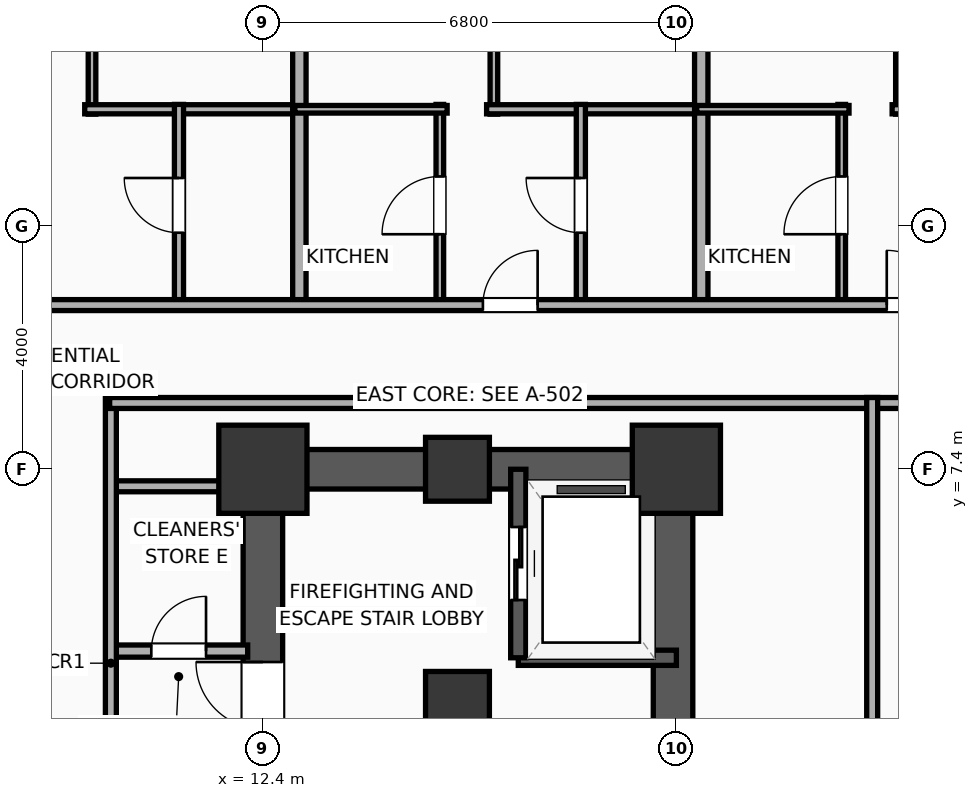
"""IFC4 building model, lengths in metres.
Left out: names, types, materials, properties, quantities, classifications, styles, units other than length and angle.
Written with IfcOpenShell. Run it as: python <this file> out.ifc"""

import sys

from ifc_helpers import new_model, si_unit, direction, frame, frame_2d, origin, origin_2d, place, context, subcontext, project, spatial, rectangle, extrude, element, fill, save


model = new_model("IFC4")
c1 = context("Model", 3, precision=1e-05, world=origin(), true_north=direction((0.0, 1.0)))
c2 = subcontext(c1, "Body", "Model", "MODEL_VIEW")
j1 = project(units=[si_unit("LENGTHUNIT", "METRE"), si_unit("PLANEANGLEUNIT", "RADIAN")], contexts=[c1])
p1 = place(None, origin())
s1 = spatial("IfcSite", under=j1, at=p1, CompositionType="ELEMENT")
p2 = place(p1, origin())
s2 = spatial("IfcBuilding", under=s1, at=p2, CompositionType="ELEMENT")
p3 = place(p2, frame((0.0, 0.0, 41.6)))
s3 = spatial("IfcBuildingStorey", under=s2, at=p3, CompositionType="ELEMENT", Elevation=41.6)
p4 = place(p3, frame((15.6, 3.55, 0.0), z_axis=(0.0, 0.0, 1.0), x_axis=(1.0, 0.0, 0.0)))
e1 = element("IfcColumn", 1, at=p4, inside=s3, PredefinedType="COLUMN", context=c2, shape_type="SweptSolid", body=[
    extrude(rectangle(XDim=1.05, YDim=1.05, at=origin_2d()), origin(), (0.0, 0.0, 1.0), 3.9),
])
p5 = place(p3, frame((12.4, 7.4, 0.0), z_axis=(0.0, 0.0, 1.0), x_axis=(1.0, 0.0, 0.0)))
e2 = element("IfcColumn", 2, at=p5, inside=s3, PredefinedType="COLUMN", context=c2, shape_type="SweptSolid", body=[
    extrude(rectangle(XDim=1.45, YDim=1.45, at=origin_2d()), origin(), (0.0, 0.0, 1.0), 3.9),
])
p6 = place(p3, frame((15.6, 7.4, 0.0), z_axis=(0.0, 0.0, 1.0), x_axis=(1.0, 0.0, 0.0)))
e3 = element("IfcColumn", 3, at=p6, inside=s3, PredefinedType="COLUMN", context=c2, shape_type="SweptSolid", body=[
    extrude(rectangle(XDim=1.05, YDim=1.05, at=origin_2d()), origin(), (0.0, 0.0, 1.0), 3.9),
])
p7 = place(p3, frame((19.2, 7.4, 0.0), z_axis=(0.0, 0.0, 1.0), x_axis=(1.0, 0.0, 0.0)))
e4 = element("IfcColumn", 4, at=p7, inside=s3, PredefinedType="COLUMN", context=c2, shape_type="SweptSolid", body=[
    extrude(rectangle(XDim=1.45, YDim=1.45, at=origin_2d()), origin(), (0.0, 0.0, 1.0), 3.9),
])
p8 = place(p3, frame((12.075, 7.4, 0.0), z_axis=(0.0, 0.0, 1.0), x_axis=(1.0, 0.0, 0.0)))
e5 = element("IfcWall", 5, at=p8, inside=s3, PredefinedType="SHEAR", context=c2, shape_type="SweptSolid", body=[
    extrude(rectangle(XDim=7.45, YDim=0.65, at=frame_2d((3.725, 0.0))), origin(), (0.0, 0.0, 1.0), 3.65),
])
p9 = place(p3, frame((12.4, -7.4, 0.0), z_axis=(0.0, 0.0, 1.0), x_axis=(0.0, 1.0, 0.0)))
e6 = element("IfcWall", 6, at=p9, inside=s3, PredefinedType="SHEAR", context=c2, shape_type="SweptSolid", body=[
    extrude(rectangle(XDim=14.8, YDim=0.65, at=frame_2d((7.4, 0.0))), origin(), (0.0, 0.0, 1.0), 3.65),
])
p10 = place(p9, frame((0.85, 0.0, 0.0)))
e7 = element("IfcOpeningElement", 7, at=p10, cuts=e6, PredefinedType="OPENING", context=c2, shape_type="SweptSolid", body=[
    extrude(rectangle(XDim=1.1, YDim=2.05, at=frame_2d((0.55, 1.025))), frame((0.0, 0.335, 0.0), z_axis=(0.0, -1.0, 0.0), x_axis=(1.0, 0.0, 0.0)), (0.0, 0.0, 1.0), 0.67),
])
p11 = place(p9, frame((10.53, 0.0, 0.0)))
e8 = element("IfcOpeningElement", 8, at=p11, cuts=e6, PredefinedType="OPENING", context=c2, shape_type="SweptSolid", body=[
    extrude(rectangle(XDim=1.1, YDim=2.05, at=frame_2d((0.55, 1.025))), frame((0.0, 0.335, 0.0), z_axis=(0.0, -1.0, 0.0), x_axis=(1.0, 0.0, 0.0)), (0.0, 0.0, 1.0), 0.67),
])
p12 = place(p3, frame((19.145, -7.4, 0.0), z_axis=(0.0, 0.0, 1.0), x_axis=(0.0, 1.0, 0.0)))
e9 = element("IfcWall", 9, at=p12, inside=s3, PredefinedType="SHEAR", context=c2, shape_type="SweptSolid", body=[
    extrude(rectangle(XDim=14.8, YDim=0.65, at=frame_2d((7.4, 0.0))), origin(), (0.0, 0.0, 1.0), 3.65),
])
p13 = place(p3, frame((16.6, 4.3, 0.0), z_axis=(0.0, 0.0, 1.0), x_axis=(1.0, 0.0, 0.0)))
e10 = element("IfcWall", 10, at=p13, inside=s3, PredefinedType="SOLIDWALL", context=c2, shape_type="SweptSolid", body=[
    extrude(rectangle(XDim=2.6, YDim=0.25, at=frame_2d((1.3, 0.0))), origin(), (0.0, 0.0, 1.0), 3.65),
])
p14 = place(p3, frame((16.6, 7.4, 0.0), z_axis=(0.0, 0.0, 1.0), x_axis=(0.0, -1.0, 0.0)))
e11 = element("IfcWall", 11, at=p14, inside=s3, PredefinedType="SOLIDWALL", context=c2, shape_type="SweptSolid", body=[
    extrude(rectangle(XDim=3.1, YDim=0.25, at=frame_2d((1.55, 0.0))), origin(), (0.0, 0.0, 1.0), 3.65),
])
p15 = place(p14, frame((0.95, 0.0, 0.0)))
e12 = element("IfcOpeningElement", 12, at=p15, cuts=e11, PredefinedType="OPENING", context=c2, shape_type="SweptSolid", body=[
    extrude(rectangle(XDim=1.2, YDim=2.05, at=frame_2d((0.6, 1.025))), frame((0.0, 0.135, 0.0), z_axis=(0.0, -1.0, 0.0), x_axis=(1.0, 0.0, 0.0)), (0.0, 0.0, 1.0), 0.27),
])
p16 = place(p3, frame((9.88, 4.41, 0.0), z_axis=(0.0, 0.0, 1.0), x_axis=(1.0, 0.0, 0.0)))
e13 = element("IfcWall", 13, at=p16, inside=s3, PredefinedType="PARTITIONING", context=c2, shape_type="SweptSolid", body=[
    extrude(rectangle(XDim=2.27, YDim=0.2, at=frame_2d((1.135, 0.0))), origin(), (0.0, 0.0, 1.0), 3.65),
])
p17 = place(p16, frame((0.685, 0.0, 0.0)))
e14 = element("IfcOpeningElement", 14, at=p17, cuts=e13, PredefinedType="OPENING", context=c2, shape_type="SweptSolid", body=[
    extrude(rectangle(XDim=0.9, YDim=2.05, at=frame_2d((0.45, 1.025))), frame((0.0, 0.11, 0.0), z_axis=(0.0, -1.0, 0.0), x_axis=(1.0, 0.0, 0.0)), (0.0, 0.0, 1.0), 0.22),
])
p18 = place(p3, frame((9.88, 7.12, 0.0), z_axis=(0.0, 0.0, 1.0), x_axis=(1.0, 0.0, 0.0)))
e15 = element("IfcWall", 15, at=p18, inside=s3, PredefinedType="PARTITIONING", context=c2, shape_type="SweptSolid", body=[
    extrude(rectangle(XDim=2.27, YDim=0.18, at=frame_2d((1.135, 0.0))), origin(), (0.0, 0.0, 1.0), 2.94),
])
p19 = place(p3, frame((9.9, -8.58, 0.0), z_axis=(0.0, 0.0, 1.0), x_axis=(0.0, 1.0, 0.0)))
e16 = element("IfcWall", 16, at=p19, inside=s3, PredefinedType="PARTITIONING", context=c2, shape_type="SweptSolid", body=[
    extrude(rectangle(XDim=17.16, YDim=0.18, at=frame_2d((8.58, 0.0))), origin(), (0.0, 0.0, 1.0), 3.65),
])
p20 = place(p19, frame((7.172, 0.0, 0.0)))
e17 = element("IfcOpeningElement", 17, at=p20, cuts=e16, PredefinedType="OPENING", context=c2, shape_type="SweptSolid", body=[
    extrude(rectangle(XDim=1.1, YDim=2.05, at=frame_2d((0.55, 1.025))), frame((0.0, 0.1, 0.0), z_axis=(0.0, -1.0, 0.0), x_axis=(1.0, 0.0, 0.0)), (0.0, 0.0, 1.0), 0.2),
])
p21 = place(p3, frame((9.88, 8.49, 0.0), z_axis=(0.0, 0.0, 1.0), x_axis=(1.0, 0.0, 0.0)))
e18 = element("IfcWall", 18, at=p21, inside=s3, PredefinedType="PARTITIONING", context=c2, shape_type="SweptSolid", body=[
    extrude(rectangle(XDim=16.33, YDim=0.18, at=frame_2d((8.165, 0.0))), origin(), (0.0, 0.0, 1.0), 3.65),
])
p22 = place(p21, frame((13.99, 0.0, 0.0)))
e19 = element("IfcOpeningElement", 19, at=p22, cuts=e18, PredefinedType="OPENING", context=c2, shape_type="SweptSolid", body=[
    extrude(rectangle(XDim=0.9, YDim=2.05, at=frame_2d((0.45, 1.025))), frame((0.0, 0.1, 0.0), z_axis=(0.0, -1.0, 0.0), x_axis=(1.0, 0.0, 0.0)), (0.0, 0.0, 1.0), 0.2),
])
p23 = place(p3, frame((9.59, 13.24, 0.0), z_axis=(0.0, 0.0, 1.0), x_axis=(0.0, 1.0, 0.0)))
e20 = element("IfcWall", 20, at=p23, inside=s3, PredefinedType="PARTITIONING", context=c2, shape_type="SweptSolid", body=[
    extrude(rectangle(XDim=9.12, YDim=0.125, at=frame_2d((4.56, 0.0))), origin(), (0.0, 0.0, 1.0), 3.65),
])
p24 = place(p23, frame((1.739, 0.0, 0.0)))
e21 = element("IfcOpeningElement", 21, at=p24, cuts=e20, PredefinedType="OPENING", context=c2, shape_type="SweptSolid", body=[
    extrude(rectangle(XDim=0.9, YDim=2.05, at=frame_2d((0.45, 1.025))), frame((0.0, 0.073, 0.0), z_axis=(0.0, -1.0, 0.0), x_axis=(1.0, 0.0, 0.0)), (0.0, 0.0, 1.0), 0.145),
])
p25 = place(p3, frame((9.47, 13.32, 0.0), z_axis=(0.0, 0.0, 1.0), x_axis=(1.0, 0.0, 0.0)))
e22 = element("IfcWall", 22, at=p25, inside=s3, PredefinedType="PLUMBINGWALL", context=c2, shape_type="SweptSolid", body=[
    extrude(rectangle(XDim=3.605, YDim=0.15, at=frame_2d((1.802, 0.0))), origin(), (0.0, 0.0, 1.0), 3.65),
])
p26 = place(p3, frame((11.02, 10.08, 0.0), z_axis=(0.0, 0.0, 1.0), x_axis=(0.0, 1.0, 0.0)))
e23 = element("IfcWall", 23, at=p26, inside=s3, PredefinedType="PLUMBINGWALL", context=c2, shape_type="SweptSolid", body=[
    extrude(rectangle(XDim=3.32, YDim=0.15, at=frame_2d((1.66, 0.0))), origin(), (0.0, 0.0, 1.0), 3.65),
])
p27 = place(p26, frame((1.21, 0.0, 0.0)))
e24 = element("IfcOpeningElement", 24, at=p27, cuts=e23, PredefinedType="OPENING", context=c2, shape_type="SweptSolid", body=[
    extrude(rectangle(XDim=0.9, YDim=2.05, at=frame_2d((0.45, 1.025))), frame((0.0, 0.085, 0.0), z_axis=(0.0, -1.0, 0.0), x_axis=(1.0, 0.0, 0.0)), (0.0, 0.0, 1.0), 0.17),
])
p28 = place(p3, frame((13.0, 10.02, 0.0), z_axis=(0.0, 0.0, 1.0), x_axis=(0.0, 1.0, 0.0)))
e25 = element("IfcWall", 25, at=p28, inside=s3, PredefinedType="PARTITIONING", context=c2, shape_type="SweptSolid", body=[
    extrude(rectangle(XDim=12.19, YDim=0.22, at=frame_2d((6.095, 0.0))), origin(), (0.0, 0.0, 1.0), 3.65),
])
p29 = place(p3, frame((16.199, 13.24, 0.0), z_axis=(0.0, 0.0, 1.0), x_axis=(0.0, 1.0, 0.0)))
e26 = element("IfcWall", 26, at=p29, inside=s3, PredefinedType="PARTITIONING", context=c2, shape_type="SweptSolid", body=[
    extrude(rectangle(XDim=9.12, YDim=0.125, at=frame_2d((4.56, 0.0))), origin(), (0.0, 0.0, 1.0), 3.65),
])
p30 = place(p29, frame((1.739, 0.0, 0.0)))
e27 = element("IfcOpeningElement", 27, at=p30, cuts=e26, PredefinedType="OPENING", context=c2, shape_type="SweptSolid", body=[
    extrude(rectangle(XDim=0.9, YDim=2.05, at=frame_2d((0.45, 1.025))), frame((0.0, 0.073, 0.0), z_axis=(0.0, -1.0, 0.0), x_axis=(1.0, 0.0, 0.0)), (0.0, 0.0, 1.0), 0.145),
])
p31 = place(p3, frame((16.079, 13.32, 0.0), z_axis=(0.0, 0.0, 1.0), x_axis=(1.0, 0.0, 0.0)))
e28 = element("IfcWall", 28, at=p31, inside=s3, PredefinedType="PLUMBINGWALL", context=c2, shape_type="SweptSolid", body=[
    extrude(rectangle(XDim=3.605, YDim=0.15, at=frame_2d((1.802, 0.0))), origin(), (0.0, 0.0, 1.0), 3.65),
])
p32 = place(p3, frame((15.31, 10.08, 0.0), z_axis=(0.0, 0.0, 1.0), x_axis=(0.0, 1.0, 0.0)))
e29 = element("IfcWall", 29, at=p32, inside=s3, PredefinedType="PARTITIONING", context=c2, shape_type="SweptSolid", body=[
    extrude(rectangle(XDim=3.32, YDim=0.125, at=frame_2d((1.66, 0.0))), origin(), (0.0, 0.0, 1.0), 3.65),
])
p33 = place(p32, frame((1.185, 0.0, 0.0)))
e30 = element("IfcOpeningElement", 30, at=p33, cuts=e29, PredefinedType="OPENING", context=c2, shape_type="SweptSolid", body=[
    extrude(rectangle(XDim=0.95, YDim=2.05, at=frame_2d((0.475, 1.025))), frame((0.0, 0.073, 0.0), z_axis=(0.0, -1.0, 0.0), x_axis=(1.0, 0.0, 0.0)), (0.0, 0.0, 1.0), 0.145),
])
p34 = place(p3, frame((12.925, 13.32, 0.0), z_axis=(0.0, 0.0, 1.0), x_axis=(1.0, 0.0, 0.0)))
e31 = element("IfcWall", 31, at=p34, inside=s3, PredefinedType="PARTITIONING", context=c2, shape_type="SweptSolid", body=[
    extrude(rectangle(XDim=2.505, YDim=0.125, at=frame_2d((1.252, 0.0))), origin(), (0.0, 0.0, 1.0), 3.65),
])
p35 = place(p3, frame((17.629, 10.08, 0.0), z_axis=(0.0, 0.0, 1.0), x_axis=(0.0, 1.0, 0.0)))
e32 = element("IfcWall", 32, at=p35, inside=s3, PredefinedType="PLUMBINGWALL", context=c2, shape_type="SweptSolid", body=[
    extrude(rectangle(XDim=3.32, YDim=0.15, at=frame_2d((1.66, 0.0))), origin(), (0.0, 0.0, 1.0), 3.65),
])
p36 = place(p35, frame((1.21, 0.0, 0.0)))
e33 = element("IfcOpeningElement", 33, at=p36, cuts=e32, PredefinedType="OPENING", context=c2, shape_type="SweptSolid", body=[
    extrude(rectangle(XDim=0.9, YDim=2.05, at=frame_2d((0.45, 1.025))), frame((0.0, 0.085, 0.0), z_axis=(0.0, -1.0, 0.0), x_axis=(1.0, 0.0, 0.0)), (0.0, 0.0, 1.0), 0.17),
])
p37 = place(p3, frame((19.609, 10.02, 0.0), z_axis=(0.0, 0.0, 1.0), x_axis=(0.0, 1.0, 0.0)))
e34 = element("IfcWall", 34, at=p37, inside=s3, PredefinedType="PARTITIONING", context=c2, shape_type="SweptSolid", body=[
    extrude(rectangle(XDim=12.19, YDim=0.22, at=frame_2d((6.095, 0.0))), origin(), (0.0, 0.0, 1.0), 3.65),
])
p38 = place(p3, frame((22.868, 13.24, 0.0), z_axis=(0.0, 0.0, 1.0), x_axis=(0.0, 1.0, 0.0)))
e35 = element("IfcWall", 35, at=p38, inside=s3, PredefinedType="PARTITIONING", context=c2, shape_type="SweptSolid", body=[
    extrude(rectangle(XDim=9.026, YDim=0.125, at=frame_2d((4.513, 0.0))), origin(), (0.0, 0.0, 1.0), 2.94),
])
p39 = place(p38, frame((1.716, 0.0, 0.0)))
e36 = element("IfcOpeningElement", 36, at=p39, cuts=e35, PredefinedType="OPENING", context=c2, shape_type="SweptSolid", body=[
    extrude(rectangle(XDim=0.9, YDim=2.05, at=frame_2d((0.45, 1.025))), frame((0.0, 0.073, 0.0), z_axis=(0.0, -1.0, 0.0), x_axis=(1.0, 0.0, 0.0)), (0.0, 0.0, 1.0), 0.145),
])
p40 = place(p3, frame((22.748, 13.32, 0.0), z_axis=(0.0, 0.0, 1.0), x_axis=(1.0, 0.0, 0.0)))
e37 = element("IfcWall", 37, at=p40, inside=s3, PredefinedType="PLUMBINGWALL", context=c2, shape_type="SweptSolid", body=[
    extrude(rectangle(XDim=3.612, YDim=0.15, at=frame_2d((1.806, 0.0))), origin(), (0.0, 0.0, 1.0), 3.65),
])
p41 = place(p3, frame((21.919, 10.08, 0.0), z_axis=(0.0, 0.0, 1.0), x_axis=(0.0, 1.0, 0.0)))
e38 = element("IfcWall", 38, at=p41, inside=s3, PredefinedType="PARTITIONING", context=c2, shape_type="SweptSolid", body=[
    extrude(rectangle(XDim=3.32, YDim=0.125, at=frame_2d((1.66, 0.0))), origin(), (0.0, 0.0, 1.0), 3.65),
])
p42 = place(p41, frame((1.185, 0.0, 0.0)))
e39 = element("IfcOpeningElement", 39, at=p42, cuts=e38, PredefinedType="OPENING", context=c2, shape_type="SweptSolid", body=[
    extrude(rectangle(XDim=0.95, YDim=2.05, at=frame_2d((0.475, 1.025))), frame((0.0, 0.073, 0.0), z_axis=(0.0, -1.0, 0.0), x_axis=(1.0, 0.0, 0.0)), (0.0, 0.0, 1.0), 0.145),
])
p43 = place(p3, frame((19.534, 13.32, 0.0), z_axis=(0.0, 0.0, 1.0), x_axis=(1.0, 0.0, 0.0)))
e40 = element("IfcWall", 40, at=p43, inside=s3, PredefinedType="PARTITIONING", context=c2, shape_type="SweptSolid", body=[
    extrude(rectangle(XDim=2.505, YDim=0.125, at=frame_2d((1.252, 0.0))), origin(), (0.0, 0.0, 1.0), 3.65),
])
p44 = place(p3, frame((-33.41, 10.1, 0.0), z_axis=(0.0, 0.0, 1.0), x_axis=(1.0, 0.0, 0.0)))
e41 = element("IfcWall", 41, at=p44, inside=s3, PredefinedType="PARTITIONING", context=c2, shape_type="SweptSolid", body=[
    extrude(rectangle(XDim=59.62, YDim=0.18, at=frame_2d((29.81, 0.0))), origin(), (0.0, 0.0, 1.0), 3.65),
])
p45 = place(p44, frame((3.354, 0.0, 0.0)))
e42 = element("IfcOpeningElement", 42, at=p45, cuts=e41, PredefinedType="OPENING", context=c2, shape_type="SweptSolid", body=[
    extrude(rectangle(XDim=1.15, YDim=2.05, at=frame_2d((0.575, 1.025))), frame((0.0, 0.1, 0.0), z_axis=(0.0, -1.0, 0.0), x_axis=(1.0, 0.0, 0.0)), (0.0, 0.0, 1.0), 0.2),
])
p46 = place(p44, frame((10.997, 0.0, 0.0)))
e43 = element("IfcOpeningElement", 43, at=p46, cuts=e41, PredefinedType="OPENING", context=c2, shape_type="SweptSolid", body=[
    extrude(rectangle(XDim=1.15, YDim=2.05, at=frame_2d((0.575, 1.025))), frame((0.0, 0.1, 0.0), z_axis=(0.0, -1.0, 0.0), x_axis=(1.0, 0.0, 0.0)), (0.0, 0.0, 1.0), 0.2),
])
p47 = place(p44, frame((20.232, 0.0, 0.0)))
e44 = element("IfcOpeningElement", 44, at=p47, cuts=e41, PredefinedType="OPENING", context=c2, shape_type="SweptSolid", body=[
    extrude(rectangle(XDim=1.15, YDim=2.05, at=frame_2d((0.575, 1.025))), frame((0.0, 0.1, 0.0), z_axis=(0.0, -1.0, 0.0), x_axis=(1.0, 0.0, 0.0)), (0.0, 0.0, 1.0), 0.2),
])
p48 = place(p44, frame((30.38, 0.0, 0.0)))
e45 = element("IfcOpeningElement", 45, at=p48, cuts=e41, PredefinedType="OPENING", context=c2, shape_type="SweptSolid", body=[
    extrude(rectangle(XDim=1.15, YDim=2.05, at=frame_2d((0.575, 1.025))), frame((0.0, 0.1, 0.0), z_axis=(0.0, -1.0, 0.0), x_axis=(1.0, 0.0, 0.0)), (0.0, 0.0, 1.0), 0.2),
])
p49 = place(p44, frame((40.998, 0.0, 0.0)))
e46 = element("IfcOpeningElement", 46, at=p49, cuts=e41, PredefinedType="OPENING", context=c2, shape_type="SweptSolid", body=[
    extrude(rectangle(XDim=1.15, YDim=2.05, at=frame_2d((0.575, 1.025))), frame((0.0, 0.1, 0.0), z_axis=(0.0, -1.0, 0.0), x_axis=(1.0, 0.0, 0.0)), (0.0, 0.0, 1.0), 0.2),
])
p50 = place(p44, frame((49.428, 0.0, 0.0)))
e47 = element("IfcOpeningElement", 47, at=p50, cuts=e41, PredefinedType="OPENING", context=c2, shape_type="SweptSolid", body=[
    extrude(rectangle(XDim=0.9, YDim=2.05, at=frame_2d((0.45, 1.025))), frame((0.0, 0.1, 0.0), z_axis=(0.0, -1.0, 0.0), x_axis=(1.0, 0.0, 0.0)), (0.0, 0.0, 1.0), 0.2),
])
p51 = place(p44, frame((56.07, 0.0, 0.0)))
e48 = element("IfcOpeningElement", 48, at=p51, cuts=e41, PredefinedType="OPENING", context=c2, shape_type="SweptSolid", body=[
    extrude(rectangle(XDim=0.9, YDim=2.05, at=frame_2d((0.45, 1.025))), frame((0.0, 0.1, 0.0), z_axis=(0.0, -1.0, 0.0), x_axis=(1.0, 0.0, 0.0)), (0.0, 0.0, 1.0), 0.2),
])
p52 = place(p3, frame((22.42, -8.58, 0.0), z_axis=(0.0, 0.0, 1.0), x_axis=(0.0, 1.0, 0.0)))
e49 = element("IfcWall", 49, at=p52, inside=s3, PredefinedType="PARTITIONING", context=c2, shape_type="SweptSolid", body=[
    extrude(rectangle(XDim=17.16, YDim=0.18, at=frame_2d((8.58, 0.0))), origin(), (0.0, 0.0, 1.0), 3.65),
])
p53 = place(p15, origin())
e50 = element("IfcDoor", 50, at=p53, inside=s3, OperationType="SLIDING_TO_LEFT", PredefinedType="DOOR", context=c2, shape_type="SweptSolid", body=[
    extrude(rectangle(XDim=1.2, YDim=2.05, at=frame_2d((0.6, 1.025))), frame((0.0, 0.025, 0.0), z_axis=(0.0, -1.0, 0.0), x_axis=(1.0, 0.0, 0.0)), (0.0, 0.0, 1.0), 0.05),
])
fill(e12, e50)
p54 = place(p17, origin())
e51 = element("IfcDoor", 51, at=p54, inside=s3, OperationType="SINGLE_SWING_RIGHT", PredefinedType="DOOR", context=c2, shape_type="SweptSolid", body=[
    extrude(rectangle(XDim=0.9, YDim=2.05, at=frame_2d((0.45, 1.025))), frame((0.0, 0.025, 0.0), z_axis=(0.0, -1.0, 0.0), x_axis=(1.0, 0.0, 0.0)), (0.0, 0.0, 1.0), 0.05),
])
fill(e14, e51)
p55 = place(p27, origin())
e52 = element("IfcDoor", 52, at=p55, inside=s3, OperationType="SINGLE_SWING_RIGHT", PredefinedType="DOOR", context=c2, shape_type="SweptSolid", body=[
    extrude(rectangle(XDim=0.9, YDim=2.05, at=frame_2d((0.45, 1.025))), frame((0.0, 0.025, 0.0), z_axis=(0.0, -1.0, 0.0), x_axis=(1.0, 0.0, 0.0)), (0.0, 0.0, 1.0), 0.05),
])
fill(e24, e52)
p56 = place(p33, origin())
e53 = element("IfcDoor", 53, at=p56, inside=s3, OperationType="SINGLE_SWING_LEFT", PredefinedType="DOOR", context=c2, shape_type="SweptSolid", body=[
    extrude(rectangle(XDim=0.95, YDim=2.05, at=frame_2d((0.475, 1.025))), frame((0.0, 0.025, 0.0), z_axis=(0.0, -1.0, 0.0), x_axis=(1.0, 0.0, 0.0)), (0.0, 0.0, 1.0), 0.05),
])
fill(e30, e53)
p57 = place(p36, origin())
e54 = element("IfcDoor", 54, at=p57, inside=s3, OperationType="SINGLE_SWING_RIGHT", PredefinedType="DOOR", context=c2, shape_type="SweptSolid", body=[
    extrude(rectangle(XDim=0.9, YDim=2.05, at=frame_2d((0.45, 1.025))), frame((0.0, 0.025, 0.0), z_axis=(0.0, -1.0, 0.0), x_axis=(1.0, 0.0, 0.0)), (0.0, 0.0, 1.0), 0.05),
])
fill(e33, e54)
p58 = place(p42, origin())
e55 = element("IfcDoor", 55, at=p58, inside=s3, OperationType="SINGLE_SWING_LEFT", PredefinedType="DOOR", context=c2, shape_type="SweptSolid", body=[
    extrude(rectangle(XDim=0.95, YDim=2.05, at=frame_2d((0.475, 1.025))), frame((0.0, 0.025, 0.0), z_axis=(0.0, -1.0, 0.0), x_axis=(1.0, 0.0, 0.0)), (0.0, 0.0, 1.0), 0.05),
])
fill(e39, e55)
p59 = place(p50, origin())
e56 = element("IfcDoor", 56, at=p59, inside=s3, OperationType="SINGLE_SWING_RIGHT", PredefinedType="DOOR", context=c2, shape_type="SweptSolid", body=[
    extrude(rectangle(XDim=0.9, YDim=2.05, at=frame_2d((0.45, 1.025))), frame((0.0, 0.025, 0.0), z_axis=(0.0, -1.0, 0.0), x_axis=(1.0, 0.0, 0.0)), (0.0, 0.0, 1.0), 0.05),
])
fill(e47, e56)
p60 = place(p51, origin())
e57 = element("IfcDoor", 57, at=p60, inside=s3, OperationType="SINGLE_SWING_LEFT", PredefinedType="DOOR", context=c2, shape_type="SweptSolid", body=[
    extrude(rectangle(XDim=0.9, YDim=2.05, at=frame_2d((0.45, 1.025))), frame((0.0, 0.025, 0.0), z_axis=(0.0, -1.0, 0.0), x_axis=(1.0, 0.0, 0.0)), (0.0, 0.0, 1.0), 0.05),
])
fill(e48, e57)
p61 = place(p11, origin())
e58 = element("IfcDoor", 58, at=p61, inside=s3, OperationType="SINGLE_SWING_RIGHT", PredefinedType="DOOR", context=c2, shape_type="SweptSolid", body=[
    extrude(rectangle(XDim=1.1, YDim=2.05, at=frame_2d((0.55, 1.025))), frame((0.0, 0.025, 0.0), z_axis=(0.0, -1.0, 0.0), x_axis=(1.0, 0.0, 0.0)), (0.0, 0.0, 1.0), 0.05),
])
fill(e8, e58)
save(model, sys.argv[1])
